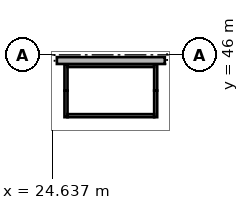
"""IFC4 building model, lengths in metres.
Left out: names, types, materials, properties, quantities, classifications, styles, units other than length and angle.
Written with IfcOpenShell. Run it as: python <this file> out.ifc"""

import sys

from ifc_helpers import new_model, si_unit, direction, frame, frame_2d, origin, origin_2d, place, context, subcontext, project, spatial, rectangle, extrude, element, fill, save


model = new_model("IFC4")
c1 = context("Model", 3, precision=1e-05, world=origin(), true_north=direction((0.0, 1.0)))
c2 = subcontext(c1, "Body", "Model", "MODEL_VIEW")
j1 = project(units=[si_unit("LENGTHUNIT", "METRE"), si_unit("PLANEANGLEUNIT", "RADIAN")], contexts=[c1])
p1 = place(None, origin())
s1 = spatial("IfcSite", under=j1, at=p1, CompositionType="ELEMENT")
p2 = place(p1, origin())
s2 = spatial("IfcBuilding", under=s1, at=p2, CompositionType="ELEMENT")
p3 = place(p2, origin())
s3 = spatial("IfcBuildingStorey", under=s2, at=p3, CompositionType="ELEMENT", Elevation=0.0)
for number, where, z_axis, x_axis in (
    (1, (24.0, 46.0, 0.0), (0.0, 0.0, 1.0), (1.0, 0.0, 0.0)),
    (2, (33.0, 46.0, 0.0), (0.0, 0.0, 1.0), (1.0, 0.0, 0.0)),
):
    element("IfcColumn", number, at=place(p3, frame(where, z_axis=z_axis, x_axis=x_axis)), inside=s3, PredefinedType="COLUMN", context=c2, shape_type="SweptSolid", body=[
        extrude(rectangle(XDim=1.6, YDim=1.2, at=origin_2d()), origin(), (0.0, 0.0, 1.0), 5.0),
    ])
for number, where, z_axis, x_axis in (
    (3, (25.55, 45.4, 0.0), (0.0, 0.0, 1.0), (0.0, -1.0, 0.0)),
    (4, (25.55, 43.65, 0.0), (0.0, 0.0, 1.0), (0.0, -1.0, 0.0)),
    (5, (31.45, 45.4, 0.0), (0.0, 0.0, 1.0), (0.0, -1.0, 0.0)),
    (6, (31.45, 43.65, 0.0), (0.0, 0.0, 1.0), (0.0, -1.0, 0.0)),
):
    element("IfcWall", number, at=place(p3, frame(where, z_axis=z_axis, x_axis=x_axis)), inside=s3, PredefinedType="SOLIDWALL", context=c2, shape_type="SweptSolid", body=[
        extrude(rectangle(XDim=1.75, YDim=0.2, at=frame_2d((0.875, 0.0))), origin(), (0.0, 0.0, 1.0), 3.2),
    ])
p4 = place(p3, frame((25.65, 42.0, 0.0), z_axis=(0.0, 0.0, 1.0), x_axis=(1.0, 0.0, 0.0)))
e7 = element("IfcWall", 7, at=p4, inside=s3, PredefinedType="SOLIDWALL", context=c2, shape_type="SweptSolid", body=[
    extrude(rectangle(XDim=5.7, YDim=0.2, at=frame_2d((2.85, 0.0))), origin(), (0.0, 0.0, 1.0), 3.2),
])
p5 = place(p4, frame((0.2, 0.0, 0.0)))
e8 = element("IfcOpeningElement", 8, at=p5, cuts=e7, PredefinedType="OPENING", context=c2, shape_type="SweptSolid", body=[
    extrude(rectangle(XDim=1.1, YDim=2.1, at=frame_2d((0.55, 1.05))), frame((0.0, 0.11, 0.0), z_axis=(0.0, -1.0, 0.0), x_axis=(1.0, 0.0, 0.0)), (0.0, 0.0, 1.0), 0.22),
])
p6 = place(p3, frame((25.65, 45.3, 0.0), z_axis=(0.0, 0.0, 1.0), x_axis=(1.0, 0.0, 0.0)))
e9 = element("IfcWall", 9, at=p6, inside=s3, PredefinedType="SOLIDWALL", context=c2, shape_type="SweptSolid", body=[
    extrude(rectangle(XDim=5.7, YDim=0.2, at=frame_2d((2.85, 0.0))), origin(), (0.0, 0.0, 1.0), 3.2),
])
p7 = place(p3, frame((24.95, 45.625, 0.0), z_axis=(0.0, 0.0, 1.0), x_axis=(1.0, 0.0, 0.0)))
e10 = element("IfcWall", 10, at=p7, inside=s3, PredefinedType="SOLIDWALL", context=c2, shape_type="SweptSolid", body=[
    extrude(rectangle(XDim=7.1, YDim=0.45, at=frame_2d((3.55, 0.0))), origin(), (0.0, 0.0, 1.0), 5.0),
])
p8 = place(p5, frame((1.1, 0.0, 0.0), z_axis=(0.0, 0.0, 1.0), x_axis=(-1.0, 0.0, 0.0)))
e11 = element("IfcDoor", 11, at=p8, inside=s3, OperationType="SINGLE_SWING_RIGHT", PredefinedType="DOOR", context=c2, shape_type="SweptSolid", body=[
    extrude(rectangle(XDim=1.1, YDim=2.1, at=frame_2d((0.55, 1.05))), frame((0.0, 0.025, 0.0), z_axis=(0.0, -1.0, 0.0), x_axis=(1.0, 0.0, 0.0)), (0.0, 0.0, 1.0), 0.05),
])
fill(e8, e11)
save(model, sys.argv[1])
